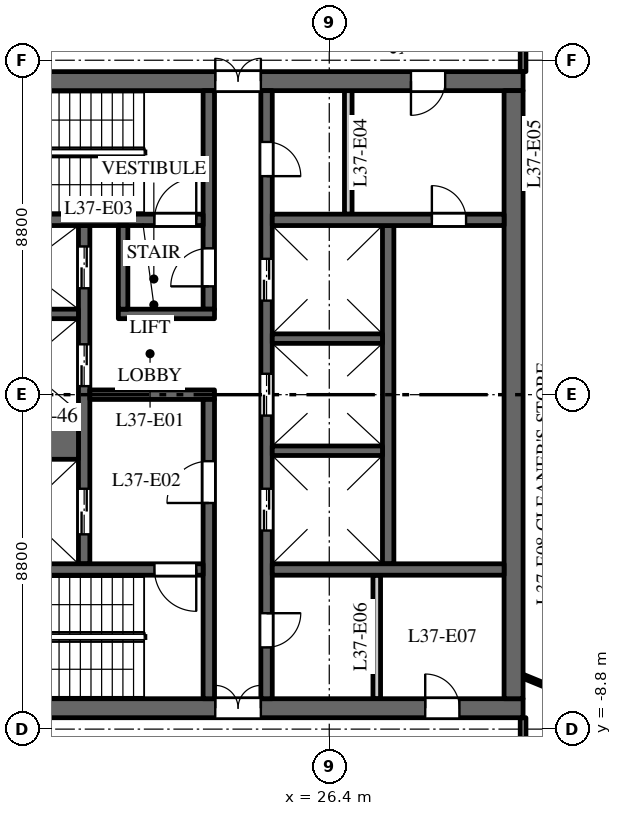
"""IFC4 building model, lengths in metres.
Left out: names, types, materials, properties, quantities, classifications, styles, units other than length and angle.
Written with IfcOpenShell. Run it as: python <this file> out.ifc"""

import sys

from ifc_helpers import new_model, si_unit, direction, frame, frame_2d, origin, place, context, subcontext, project, spatial, rectangle, extrude, element, fill, save


model = new_model("IFC4")
c1 = context("Model", 3, precision=1e-05, world=origin(), true_north=direction((0.0, 1.0)))
c2 = subcontext(c1, "Body", "Model", "MODEL_VIEW")
j1 = project(units=[si_unit("LENGTHUNIT", "METRE"), si_unit("PLANEANGLEUNIT", "RADIAN")], contexts=[c1])
p1 = place(None, origin())
s1 = spatial("IfcSite", under=j1, at=p1, CompositionType="ELEMENT")
p2 = place(p1, origin())
s2 = spatial("IfcBuilding", under=s1, at=p2, CompositionType="ELEMENT")
p3 = place(p2, frame((0.0, 0.0, 162.0)))
s3 = spatial("IfcBuildingStorey", under=s2, at=p3, CompositionType="ELEMENT", Elevation=162.0)
p4 = place(p3, frame((16.5, 8.25, 0.0), z_axis=(0.0, 0.0, 1.0), x_axis=(1.0, 0.0, 0.0)))
e1 = element("IfcWall", 1, at=p4, inside=s3, PredefinedType="SHEAR", context=c2, shape_type="SweptSolid", body=[
    extrude(rectangle(XDim=15.0, YDim=0.5, at=frame_2d((7.5, 0.0))), origin(), (0.0, 0.0, 1.0), 3.7),
])
p5 = place(p4, frame((6.9, 0.0, 0.0)))
e2 = element("IfcOpeningElement", 2, at=p5, cuts=e1, PredefinedType="OPENING", context=c2, shape_type="SweptSolid", body=[
    extrude(rectangle(XDim=1.2, YDim=2.1, at=frame_2d((0.6, 1.05))), frame((0.0, 0.26, 0.0), z_axis=(0.0, -1.0, 0.0), x_axis=(1.0, 0.0, 0.0)), (0.0, 0.0, 1.0), 0.52),
])
p6 = place(p4, frame((12.05, 0.0, 0.0)))
e3 = element("IfcOpeningElement", 3, at=p6, cuts=e1, PredefinedType="OPENING", context=c2, shape_type="SweptSolid", body=[
    extrude(rectangle(XDim=0.9, YDim=2.1, at=frame_2d((0.45, 1.05))), frame((0.0, 0.26, 0.0), z_axis=(0.0, -1.0, 0.0), x_axis=(1.0, 0.0, 0.0)), (0.0, 0.0, 1.0), 0.52),
])
p7 = place(p3, frame((16.5, -8.25, 0.0), z_axis=(0.0, 0.0, 1.0), x_axis=(1.0, 0.0, 0.0)))
e4 = element("IfcWall", 4, at=p7, inside=s3, PredefinedType="SHEAR", context=c2, shape_type="SweptSolid", body=[
    extrude(rectangle(XDim=15.0, YDim=0.5, at=frame_2d((7.5, 0.0))), origin(), (0.0, 0.0, 1.0), 3.7),
])
p8 = place(p7, frame((6.9, 0.0, 0.0)))
e5 = element("IfcOpeningElement", 5, at=p8, cuts=e4, PredefinedType="OPENING", context=c2, shape_type="SweptSolid", body=[
    extrude(rectangle(XDim=1.2, YDim=2.1, at=frame_2d((0.6, 1.05))), frame((0.0, 0.26, 0.0), z_axis=(0.0, -1.0, 0.0), x_axis=(1.0, 0.0, 0.0)), (0.0, 0.0, 1.0), 0.52),
])
p9 = place(p7, frame((12.425, 0.0, 0.0)))
e6 = element("IfcOpeningElement", 6, at=p9, cuts=e4, PredefinedType="OPENING", context=c2, shape_type="SweptSolid", body=[
    extrude(rectangle(XDim=0.9, YDim=2.1, at=frame_2d((0.45, 1.05))), frame((0.0, 0.26, 0.0), z_axis=(0.0, -1.0, 0.0), x_axis=(1.0, 0.0, 0.0)), (0.0, 0.0, 1.0), 0.52),
])
p10 = place(p3, frame((27.95, -4.45, 0.0), z_axis=(0.0, 0.0, 1.0), x_axis=(0.0, 1.0, 0.0)))
e7 = element("IfcWall", 7, at=p10, inside=s3, PredefinedType="SHEAR", context=c2, shape_type="SweptSolid", body=[
    extrude(rectangle(XDim=8.9, YDim=0.3, at=frame_2d((4.45, 0.0))), origin(), (0.0, 0.0, 1.0), 3.7),
])
p11 = place(p3, frame((19.95, -4.45, 0.0), z_axis=(0.0, 0.0, 1.0), x_axis=(0.0, 1.0, 0.0)))
e8 = element("IfcWall", 8, at=p11, inside=s3, PredefinedType="SHEAR", context=c2, shape_type="SweptSolid", body=[
    extrude(rectangle(XDim=8.9, YDim=0.3, at=frame_2d((4.45, 0.0))), origin(), (0.0, 0.0, 1.0), 3.7),
])
p12 = place(p11, frame((0.775, 0.0, 0.0)))
e9 = element("IfcOpeningElement", 9, at=p12, cuts=e8, PredefinedType="OPENING", context=c2, shape_type="SweptSolid", body=[
    extrude(rectangle(XDim=1.2, YDim=2.1, at=frame_2d((0.6, 1.05))), frame((0.0, 0.16, 0.0), z_axis=(0.0, -1.0, 0.0), x_axis=(1.0, 0.0, 0.0)), (0.0, 0.0, 1.0), 0.32),
])
p13 = place(p11, frame((4.675, 0.0, 0.0)))
e10 = element("IfcOpeningElement", 10, at=p13, cuts=e8, PredefinedType="OPENING", context=c2, shape_type="SweptSolid", body=[
    extrude(rectangle(XDim=1.1, YDim=2.1, at=frame_2d((0.55, 1.05))), frame((0.0, 0.16, 0.0), z_axis=(0.0, -1.0, 0.0), x_axis=(1.0, 0.0, 0.0)), (0.0, 0.0, 1.0), 0.32),
])
p14 = place(p11, frame((7.25, 0.0, 0.0)))
e11 = element("IfcOpeningElement", 11, at=p14, cuts=e8, PredefinedType="OPENING", context=c2, shape_type="SweptSolid", body=[
    extrude(rectangle(XDim=1.1, YDim=2.1, at=frame_2d((0.55, 1.05))), frame((0.0, 0.16, 0.0), z_axis=(0.0, -1.0, 0.0), x_axis=(1.0, 0.0, 0.0)), (0.0, 0.0, 1.0), 0.32),
])
p15 = place(p3, frame((24.75, -8.0, 0.0), z_axis=(0.0, 0.0, 1.0), x_axis=(0.0, 1.0, 0.0)))
e12 = element("IfcWall", 12, at=p15, inside=s3, PredefinedType="SHEAR", context=c2, shape_type="SweptSolid", body=[
    extrude(rectangle(XDim=16.0, YDim=0.3, at=frame_2d((8.0, 0.0))), origin(), (0.0, 0.0, 1.0), 3.7),
])
p16 = place(p15, frame((4.425, 0.0, 0.0)))
e13 = element("IfcOpeningElement", 13, at=p16, cuts=e12, PredefinedType="OPENING", context=c2, shape_type="SweptSolid", body=[
    extrude(rectangle(XDim=1.1, YDim=2.1, at=frame_2d((0.55, 1.05))), frame((0.0, 0.16, 0.0), z_axis=(0.0, -1.0, 0.0), x_axis=(1.0, 0.0, 0.0)), (0.0, 0.0, 1.0), 0.32),
])
p17 = place(p15, frame((7.45, 0.0, 0.0)))
e14 = element("IfcOpeningElement", 14, at=p17, cuts=e12, PredefinedType="OPENING", context=c2, shape_type="SweptSolid", body=[
    extrude(rectangle(XDim=1.1, YDim=2.1, at=frame_2d((0.55, 1.05))), frame((0.0, 0.16, 0.0), z_axis=(0.0, -1.0, 0.0), x_axis=(1.0, 0.0, 0.0)), (0.0, 0.0, 1.0), 0.32),
])
p18 = place(p15, frame((10.475, 0.0, 0.0)))
e15 = element("IfcOpeningElement", 15, at=p18, cuts=e12, PredefinedType="OPENING", context=c2, shape_type="SweptSolid", body=[
    extrude(rectangle(XDim=1.1, YDim=2.1, at=frame_2d((0.55, 1.05))), frame((0.0, 0.16, 0.0), z_axis=(0.0, -1.0, 0.0), x_axis=(1.0, 0.0, 0.0)), (0.0, 0.0, 1.0), 0.32),
])
p19 = place(p15, frame((13.75, 0.0, 0.0)))
e16 = element("IfcOpeningElement", 16, at=p19, cuts=e12, PredefinedType="OPENING", context=c2, shape_type="SweptSolid", body=[
    extrude(rectangle(XDim=0.9, YDim=2.1, at=frame_2d((0.45, 1.05))), frame((0.0, 0.16, 0.0), z_axis=(0.0, -1.0, 0.0), x_axis=(1.0, 0.0, 0.0)), (0.0, 0.0, 1.0), 0.32),
])
p20 = place(p15, frame((1.35, 0.0, 0.0)))
e17 = element("IfcOpeningElement", 17, at=p20, cuts=e12, PredefinedType="OPENING", context=c2, shape_type="SweptSolid", body=[
    extrude(rectangle(XDim=0.9, YDim=2.1, at=frame_2d((0.45, 1.05))), frame((0.0, 0.16, 0.0), z_axis=(0.0, -1.0, 0.0), x_axis=(1.0, 0.0, 0.0)), (0.0, 0.0, 1.0), 0.32),
])
p21 = place(p3, frame((20.1, 0.0, 0.0), z_axis=(0.0, 0.0, 1.0), x_axis=(1.0, 0.0, 0.0)))
e18 = element("IfcWall", 18, at=p21, inside=s3, PredefinedType="SHEAR", context=c2, shape_type="SweptSolid", body=[
    extrude(rectangle(XDim=3.28, YDim=0.25, at=frame_2d((1.64, 0.0))), origin(), (0.0, 0.0, 1.0), 3.7),
])
p22 = place(p3, frame((31.25, -8.0, 0.0), z_axis=(0.0, 0.0, 1.0), x_axis=(0.0, 1.0, 0.0)))
e19 = element("IfcWall", 19, at=p22, inside=s3, PredefinedType="SHEAR", context=c2, shape_type="SweptSolid", body=[
    extrude(rectangle(XDim=16.0, YDim=0.5, at=frame_2d((8.0, 0.0))), origin(), (0.0, 0.0, 1.0), 3.7),
])
p23 = place(p3, frame((24.9, 4.6, 0.0), z_axis=(0.0, 0.0, 1.0), x_axis=(1.0, 0.0, 0.0)))
e20 = element("IfcWall", 20, at=p23, inside=s3, PredefinedType="SHEAR", context=c2, shape_type="SweptSolid", body=[
    extrude(rectangle(XDim=6.1, YDim=0.3, at=frame_2d((3.05, 0.0))), origin(), (0.0, 0.0, 1.0), 3.7),
])
p24 = place(p23, frame((4.2, 0.0, 0.0)))
e21 = element("IfcOpeningElement", 21, at=p24, cuts=e20, PredefinedType="OPENING", context=c2, shape_type="SweptSolid", body=[
    extrude(rectangle(XDim=0.9, YDim=2.1, at=frame_2d((0.45, 1.05))), frame((0.0, 0.16, 0.0), z_axis=(0.0, -1.0, 0.0), x_axis=(1.0, 0.0, 0.0)), (0.0, 0.0, 1.0), 0.32),
])
for number, where, z_axis, x_axis in (
    (22, (26.9, 4.75, 0.0), (0.0, 0.0, 1.0), (0.0, 1.0, 0.0)),
    (23, (27.65, -8.0, 0.0), (0.0, 0.0, 1.0), (0.0, 1.0, 0.0)),
):
    element("IfcWall", number, at=place(p3, frame(where, z_axis=z_axis, x_axis=x_axis)), inside=s3, PredefinedType="PARTITIONING", context=c2, shape_type="SweptSolid", body=[
        extrude(rectangle(XDim=3.25, YDim=0.2, at=frame_2d((1.625, 0.0))), origin(), (0.0, 0.0, 1.0), 3.7),
    ])
p25 = place(p3, frame((24.9, -4.6, 0.0), z_axis=(0.0, 0.0, 1.0), x_axis=(1.0, 0.0, 0.0)))
e24 = element("IfcWall", 24, at=p25, inside=s3, PredefinedType="SHEAR", context=c2, shape_type="SweptSolid", body=[
    extrude(rectangle(XDim=6.1, YDim=0.3, at=frame_2d((3.05, 0.0))), origin(), (0.0, 0.0, 1.0), 3.7),
])
p26 = place(p3, frame((16.9, -1.075, 0.0), z_axis=(0.0, 0.0, 1.0), x_axis=(1.0, 0.0, 0.0)))
e25 = element("IfcWall", 25, at=p26, inside=s3, PredefinedType="SHEAR", context=c2, shape_type="SweptSolid", body=[
    extrude(rectangle(XDim=2.9, YDim=1.25, at=frame_2d((1.45, 0.0))), origin(), (0.0, 0.0, 1.0), 3.7),
])
for number, where, z_axis, x_axis in (
    (26, (16.9, 2.125, 0.0), (0.0, 0.0, 1.0), (1.0, 0.0, 0.0)),
    (27, (24.9, -1.475, 0.0), (0.0, 0.0, 1.0), (1.0, 0.0, 0.0)),
    (28, (24.9, 1.475, 0.0), (0.0, 0.0, 1.0), (1.0, 0.0, 0.0)),
):
    element("IfcWall", number, at=place(p3, frame(where, z_axis=z_axis, x_axis=x_axis)), inside=s3, PredefinedType="SHEAR", context=c2, shape_type="SweptSolid", body=[
        extrude(rectangle(XDim=2.9, YDim=0.25, at=frame_2d((1.45, 0.0))), origin(), (0.0, 0.0, 1.0), 3.7),
    ])
p27 = place(p3, frame((23.23, 2.25, 0.0), z_axis=(0.0, 0.0, 1.0), x_axis=(0.0, 1.0, 0.0)))
e29 = element("IfcWall", 29, at=p27, inside=s3, PredefinedType="SHEAR", context=c2, shape_type="SweptSolid", body=[
    extrude(rectangle(XDim=5.75, YDim=0.3, at=frame_2d((2.875, 0.0))), origin(), (0.0, 0.0, 1.0), 3.7),
])
p28 = place(p27, frame((0.6, 0.0, 0.0)))
e30 = element("IfcOpeningElement", 30, at=p28, cuts=e29, PredefinedType="OPENING", context=c2, shape_type="SweptSolid", body=[
    extrude(rectangle(XDim=1.0, YDim=2.1, at=frame_2d((0.5, 1.05))), frame((0.0, 0.16, 0.0), z_axis=(0.0, -1.0, 0.0), x_axis=(1.0, 0.0, 0.0)), (0.0, 0.0, 1.0), 0.32),
])
p29 = place(p3, frame((23.23, -8.0, 0.0), z_axis=(0.0, 0.0, 1.0), x_axis=(0.0, 1.0, 0.0)))
e31 = element("IfcWall", 31, at=p29, inside=s3, PredefinedType="SHEAR", context=c2, shape_type="SweptSolid", body=[
    extrude(rectangle(XDim=7.875, YDim=0.3, at=frame_2d((3.938, 0.0))), origin(), (0.0, 0.0, 1.0), 3.7),
])
p30 = place(p29, frame((5.15, 0.0, 0.0)))
e32 = element("IfcOpeningElement", 32, at=p30, cuts=e31, PredefinedType="OPENING", context=c2, shape_type="SweptSolid", body=[
    extrude(rectangle(XDim=1.1, YDim=2.1, at=frame_2d((0.55, 1.05))), frame((0.0, 0.16, 0.0), z_axis=(0.0, -1.0, 0.0), x_axis=(1.0, 0.0, 0.0)), (0.0, 0.0, 1.0), 0.32),
])
p31 = place(p3, frame((16.9, 4.6, 0.0), z_axis=(0.0, 0.0, 1.0), x_axis=(1.0, 0.0, 0.0)))
e33 = element("IfcWall", 33, at=p31, inside=s3, PredefinedType="SHEAR", context=c2, shape_type="SweptSolid", body=[
    extrude(rectangle(XDim=6.18, YDim=0.3, at=frame_2d((3.09, 0.0))), origin(), (0.0, 0.0, 1.0), 3.7),
])
p32 = place(p31, frame((4.9, 0.0, 0.0)))
e34 = element("IfcOpeningElement", 34, at=p32, cuts=e33, PredefinedType="OPENING", context=c2, shape_type="SweptSolid", body=[
    extrude(rectangle(XDim=1.1, YDim=2.1, at=frame_2d((0.55, 1.05))), frame((0.0, 0.16, 0.0), z_axis=(0.0, -1.0, 0.0), x_axis=(1.0, 0.0, 0.0)), (0.0, 0.0, 1.0), 0.32),
])
p33 = place(p3, frame((16.9, -4.6, 0.0), z_axis=(0.0, 0.0, 1.0), x_axis=(1.0, 0.0, 0.0)))
e35 = element("IfcWall", 35, at=p33, inside=s3, PredefinedType="SHEAR", context=c2, shape_type="SweptSolid", body=[
    extrude(rectangle(XDim=6.18, YDim=0.3, at=frame_2d((3.09, 0.0))), origin(), (0.0, 0.0, 1.0), 3.7),
])
p34 = place(p33, frame((4.9, 0.0, 0.0)))
e36 = element("IfcOpeningElement", 36, at=p34, cuts=e35, PredefinedType="OPENING", context=c2, shape_type="SweptSolid", body=[
    extrude(rectangle(XDim=1.1, YDim=2.1, at=frame_2d((0.55, 1.05))), frame((0.0, 0.16, 0.0), z_axis=(0.0, -1.0, 0.0), x_axis=(1.0, 0.0, 0.0)), (0.0, 0.0, 1.0), 0.32),
])
p35 = place(p3, frame((20.85, 2.125, 0.0), z_axis=(0.0, 0.0, 1.0), x_axis=(1.0, 0.0, 0.0)))
e37 = element("IfcWall", 37, at=p35, inside=s3, PredefinedType="SHEAR", context=c2, shape_type="SweptSolid", body=[
    extrude(rectangle(XDim=2.53, YDim=0.25, at=frame_2d((1.265, 0.0))), origin(), (0.0, 0.0, 1.0), 3.7),
])
p36 = place(p3, frame((20.975, 2.25, 0.0), z_axis=(0.0, 0.0, 1.0), x_axis=(0.0, 1.0, 0.0)))
e38 = element("IfcWall", 38, at=p36, inside=s3, PredefinedType="SHEAR", context=c2, shape_type="SweptSolid", body=[
    extrude(rectangle(XDim=2.2, YDim=0.25, at=frame_2d((1.1, 0.0))), origin(), (0.0, 0.0, 1.0), 3.7),
])
p37 = place(p3, frame((31.5, -10.7, 0.0), z_axis=(0.0, 0.0, 1.0), x_axis=(0.0, 1.0, 0.0)))
e39 = element("IfcWall", 39, at=p37, inside=s3, PredefinedType="PARTITIONING", context=c2, shape_type="SweptSolid", body=[
    extrude(rectangle(XDim=2.2, YDim=0.15, at=frame_2d((1.1, 0.0))), origin(), (0.0, 0.0, 1.0), 2.9),
])
p38 = place(p3, frame((31.5, -7.41, 0.0), z_axis=(0.0, 0.0, 1.0), x_axis=(0.925344112436, -0.379128307542, 0.0)))
e40 = element("IfcWall", 40, at=p38, inside=s3, PredefinedType="PARTITIONING", context=c2, shape_type="SweptSolid", body=[
    extrude(rectangle(XDim=2.954, YDim=0.1, at=frame_2d((1.477, 0.0))), origin(), (0.0, 0.0, 1.0), 3.7),
])
p39 = place(p3, frame((31.5, 8.5, 0.0), z_axis=(0.0, 0.0, 1.0), x_axis=(0.0, 1.0, 0.0)))
e41 = element("IfcWall", 41, at=p39, inside=s3, PredefinedType="PARTITIONING", context=c2, shape_type="SweptSolid", body=[
    extrude(rectangle(XDim=2.2, YDim=0.15, at=frame_2d((1.1, 0.0))), origin(), (0.0, 0.0, 1.0), 2.9),
])
p40 = place(p12, origin())
e42 = element("IfcDoor", 42, at=p40, inside=s3, OperationType="DOUBLE_DOOR_SLIDING", PredefinedType="DOOR", context=c2, shape_type="SweptSolid", body=[
    extrude(rectangle(XDim=1.2, YDim=2.1, at=frame_2d((0.6, 1.05))), frame((0.0, 0.025, 0.0), z_axis=(0.0, -1.0, 0.0), x_axis=(1.0, 0.0, 0.0)), (0.0, 0.0, 1.0), 0.05),
])
fill(e9, e42)
p41 = place(p13, origin())
e43 = element("IfcDoor", 43, at=p41, inside=s3, OperationType="DOUBLE_DOOR_SLIDING", PredefinedType="DOOR", context=c2, shape_type="SweptSolid", body=[
    extrude(rectangle(XDim=1.1, YDim=2.1, at=frame_2d((0.55, 1.05))), frame((0.0, 0.025, 0.0), z_axis=(0.0, -1.0, 0.0), x_axis=(1.0, 0.0, 0.0)), (0.0, 0.0, 1.0), 0.05),
])
fill(e10, e43)
p42 = place(p14, origin())
e44 = element("IfcDoor", 44, at=p42, inside=s3, OperationType="DOUBLE_DOOR_SLIDING", PredefinedType="DOOR", context=c2, shape_type="SweptSolid", body=[
    extrude(rectangle(XDim=1.1, YDim=2.1, at=frame_2d((0.55, 1.05))), frame((0.0, 0.025, 0.0), z_axis=(0.0, -1.0, 0.0), x_axis=(1.0, 0.0, 0.0)), (0.0, 0.0, 1.0), 0.05),
])
fill(e11, e44)
p43 = place(p16, origin())
e45 = element("IfcDoor", 45, at=p43, inside=s3, OperationType="DOUBLE_DOOR_SLIDING", PredefinedType="DOOR", context=c2, shape_type="SweptSolid", body=[
    extrude(rectangle(XDim=1.1, YDim=2.1, at=frame_2d((0.55, 1.05))), frame((0.0, 0.025, 0.0), z_axis=(0.0, -1.0, 0.0), x_axis=(1.0, 0.0, 0.0)), (0.0, 0.0, 1.0), 0.05),
])
fill(e13, e45)
p44 = place(p17, origin())
e46 = element("IfcDoor", 46, at=p44, inside=s3, OperationType="DOUBLE_DOOR_SLIDING", PredefinedType="DOOR", context=c2, shape_type="SweptSolid", body=[
    extrude(rectangle(XDim=1.1, YDim=2.1, at=frame_2d((0.55, 1.05))), frame((0.0, 0.025, 0.0), z_axis=(0.0, -1.0, 0.0), x_axis=(1.0, 0.0, 0.0)), (0.0, 0.0, 1.0), 0.05),
])
fill(e14, e46)
p45 = place(p18, origin())
e47 = element("IfcDoor", 47, at=p45, inside=s3, OperationType="DOUBLE_DOOR_SLIDING", PredefinedType="DOOR", context=c2, shape_type="SweptSolid", body=[
    extrude(rectangle(XDim=1.1, YDim=2.1, at=frame_2d((0.55, 1.05))), frame((0.0, 0.025, 0.0), z_axis=(0.0, -1.0, 0.0), x_axis=(1.0, 0.0, 0.0)), (0.0, 0.0, 1.0), 0.05),
])
fill(e15, e47)
p46 = place(p32, origin())
e48 = element("IfcDoor", 48, at=p46, inside=s3, OperationType="SINGLE_SWING_LEFT", PredefinedType="DOOR", context=c2, shape_type="SweptSolid", body=[
    extrude(rectangle(XDim=1.1, YDim=2.1, at=frame_2d((0.55, 1.05))), frame((0.0, 0.025, 0.0), z_axis=(0.0, -1.0, 0.0), x_axis=(1.0, 0.0, 0.0)), (0.0, 0.0, 1.0), 0.05),
])
fill(e34, e48)
p47 = place(p34, origin())
e49 = element("IfcDoor", 49, at=p47, inside=s3, OperationType="SINGLE_SWING_RIGHT", PredefinedType="DOOR", context=c2, shape_type="SweptSolid", body=[
    extrude(rectangle(XDim=1.1, YDim=2.1, at=frame_2d((0.55, 1.05))), frame((0.0, 0.025, 0.0), z_axis=(0.0, -1.0, 0.0), x_axis=(1.0, 0.0, 0.0)), (0.0, 0.0, 1.0), 0.05),
])
fill(e36, e49)
p48 = place(p30, origin())
e50 = element("IfcDoor", 50, at=p48, inside=s3, OperationType="SINGLE_SWING_RIGHT", PredefinedType="DOOR", context=c2, shape_type="SweptSolid", body=[
    extrude(rectangle(XDim=1.1, YDim=2.1, at=frame_2d((0.55, 1.05))), frame((0.0, 0.025, 0.0), z_axis=(0.0, -1.0, 0.0), x_axis=(1.0, 0.0, 0.0)), (0.0, 0.0, 1.0), 0.05),
])
fill(e32, e50)
p49 = place(p28, origin())
e51 = element("IfcDoor", 51, at=p49, inside=s3, OperationType="SINGLE_SWING_RIGHT", PredefinedType="DOOR", context=c2, shape_type="SweptSolid", body=[
    extrude(rectangle(XDim=1.0, YDim=2.1, at=frame_2d((0.5, 1.05))), frame((0.0, 0.025, 0.0), z_axis=(0.0, -1.0, 0.0), x_axis=(1.0, 0.0, 0.0)), (0.0, 0.0, 1.0), 0.05),
])
fill(e30, e51)
p50 = place(p5, origin())
e52 = element("IfcDoor", 52, at=p50, inside=s3, OperationType="DOUBLE_DOOR_DOUBLE_SWING", PredefinedType="DOOR", context=c2, shape_type="SweptSolid", body=[
    extrude(rectangle(XDim=1.2, YDim=2.1, at=frame_2d((0.6, 1.05))), frame((0.0, 0.025, 0.0), z_axis=(0.0, -1.0, 0.0), x_axis=(1.0, 0.0, 0.0)), (0.0, 0.0, 1.0), 0.05),
])
fill(e2, e52)
p51 = place(p8, origin())
e53 = element("IfcDoor", 53, at=p51, inside=s3, OperationType="DOUBLE_DOOR_DOUBLE_SWING", PredefinedType="DOOR", context=c2, shape_type="SweptSolid", body=[
    extrude(rectangle(XDim=1.2, YDim=2.1, at=frame_2d((0.6, 1.05))), frame((0.0, 0.025, 0.0), z_axis=(0.0, -1.0, 0.0), x_axis=(1.0, 0.0, 0.0)), (0.0, 0.0, 1.0), 0.05),
])
fill(e5, e53)
p52 = place(p19, origin())
e54 = element("IfcDoor", 54, at=p52, inside=s3, OperationType="SINGLE_SWING_LEFT", PredefinedType="DOOR", context=c2, shape_type="SweptSolid", body=[
    extrude(rectangle(XDim=0.9, YDim=2.1, at=frame_2d((0.45, 1.05))), frame((0.0, 0.025, 0.0), z_axis=(0.0, -1.0, 0.0), x_axis=(1.0, 0.0, 0.0)), (0.0, 0.0, 1.0), 0.05),
])
fill(e16, e54)
p53 = place(p6, origin())
e55 = element("IfcDoor", 55, at=p53, inside=s3, OperationType="SINGLE_SWING_LEFT", PredefinedType="DOOR", context=c2, shape_type="SweptSolid", body=[
    extrude(rectangle(XDim=0.9, YDim=2.1, at=frame_2d((0.45, 1.05))), frame((0.0, 0.025, 0.0), z_axis=(0.0, -1.0, 0.0), x_axis=(1.0, 0.0, 0.0)), (0.0, 0.0, 1.0), 0.05),
])
fill(e3, e55)
p54 = place(p20, origin())
e56 = element("IfcDoor", 56, at=p54, inside=s3, OperationType="SINGLE_SWING_RIGHT", PredefinedType="DOOR", context=c2, shape_type="SweptSolid", body=[
    extrude(rectangle(XDim=0.9, YDim=2.1, at=frame_2d((0.45, 1.05))), frame((0.0, 0.025, 0.0), z_axis=(0.0, -1.0, 0.0), x_axis=(1.0, 0.0, 0.0)), (0.0, 0.0, 1.0), 0.05),
])
fill(e17, e56)
p55 = place(p9, origin())
e57 = element("IfcDoor", 57, at=p55, inside=s3, OperationType="SINGLE_SWING_RIGHT", PredefinedType="DOOR", context=c2, shape_type="SweptSolid", body=[
    extrude(rectangle(XDim=0.9, YDim=2.1, at=frame_2d((0.45, 1.05))), frame((0.0, 0.025, 0.0), z_axis=(0.0, -1.0, 0.0), x_axis=(1.0, 0.0, 0.0)), (0.0, 0.0, 1.0), 0.05),
])
fill(e6, e57)
p56 = place(p24, origin())
e58 = element("IfcDoor", 58, at=p56, inside=s3, OperationType="SINGLE_SWING_RIGHT", PredefinedType="DOOR", context=c2, shape_type="SweptSolid", body=[
    extrude(rectangle(XDim=0.9, YDim=2.1, at=frame_2d((0.45, 1.05))), frame((0.0, 0.025, 0.0), z_axis=(0.0, -1.0, 0.0), x_axis=(1.0, 0.0, 0.0)), (0.0, 0.0, 1.0), 0.05),
])
fill(e21, e58)
save(model, sys.argv[1])
